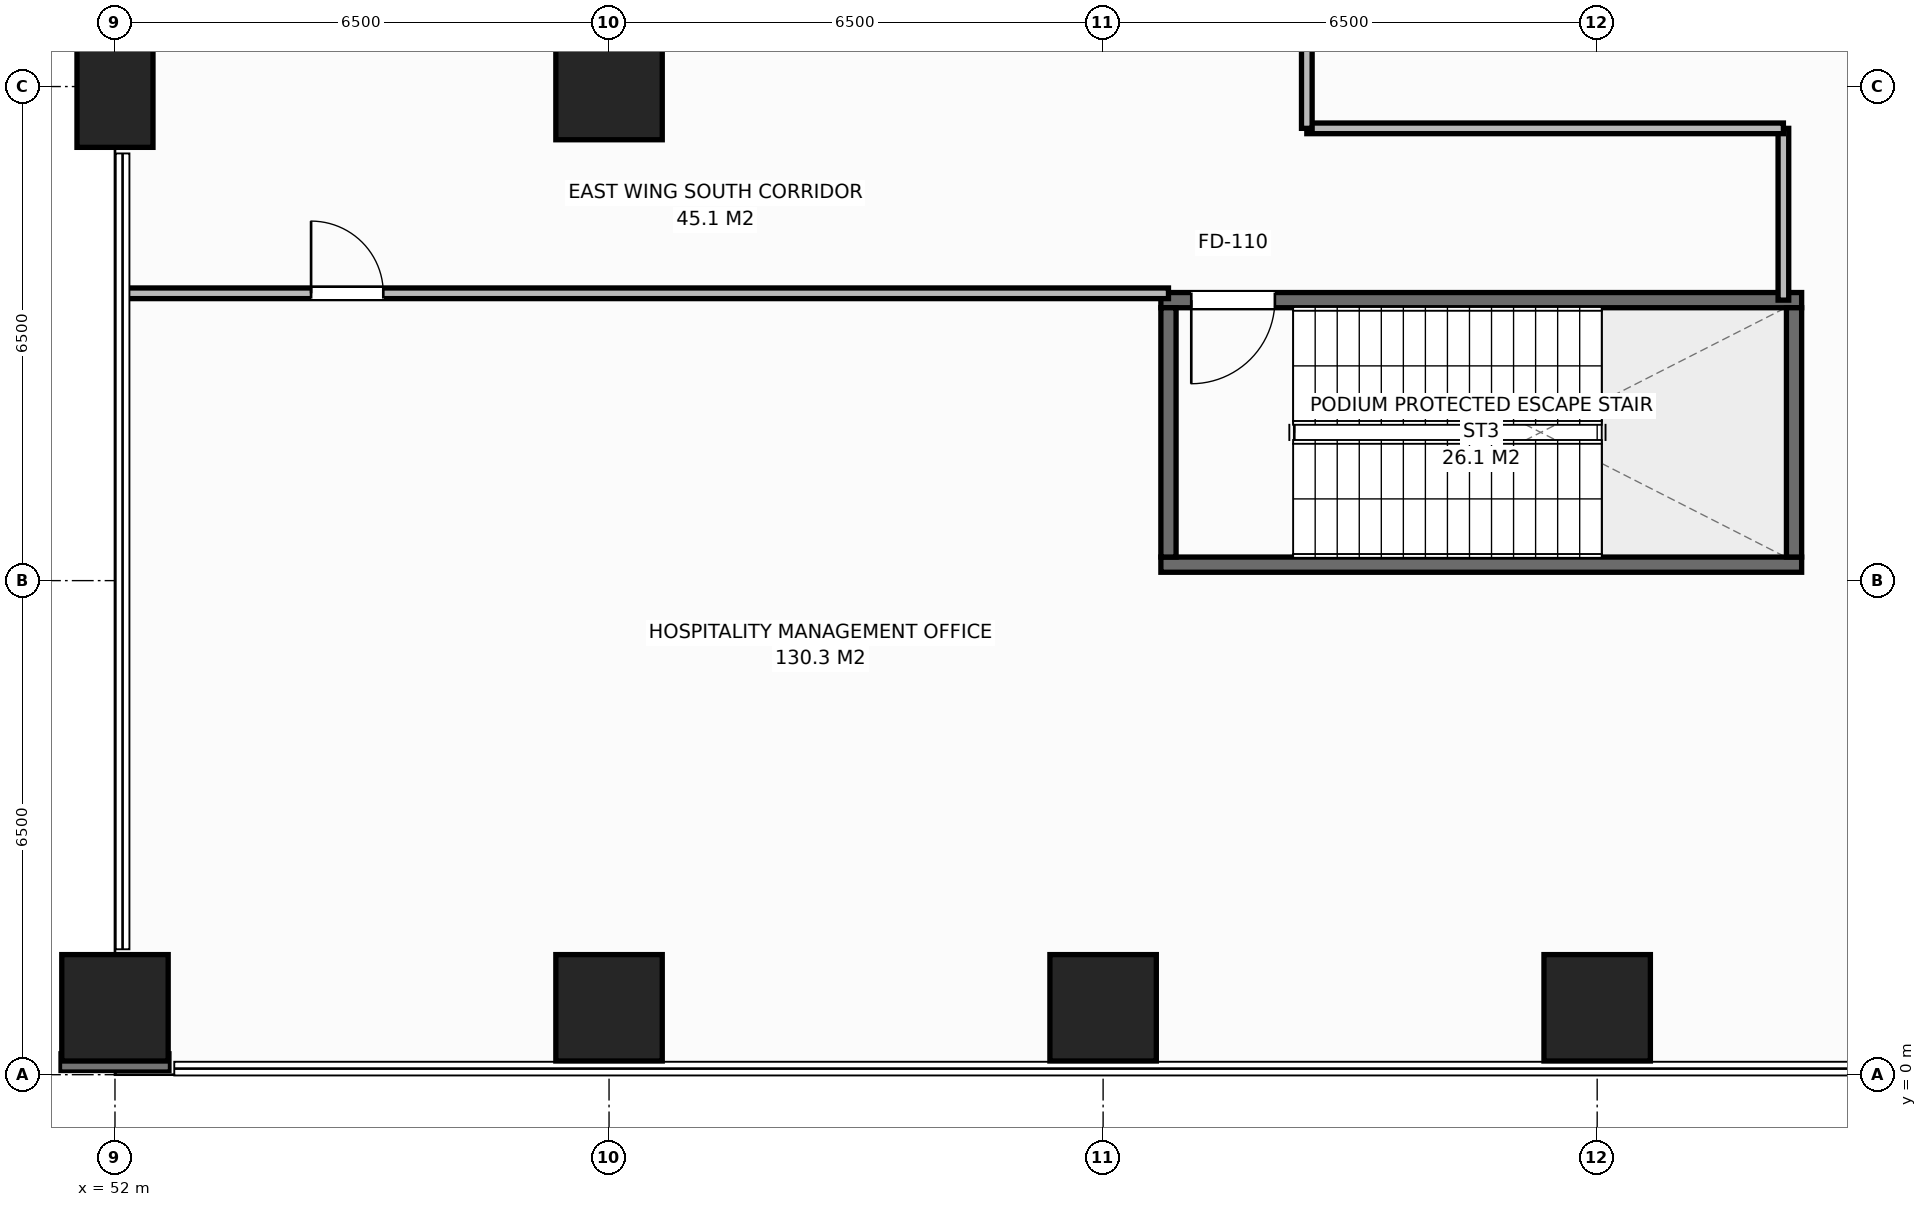
"""IFC4 building model, lengths in metres.
Left out: names, types, materials, properties, quantities, classifications, styles, units other than length and angle.
Written with IfcOpenShell. Run it as: python <this file> out.ifc"""

import sys

from ifc_helpers import new_model, si_unit, direction, frame, frame_2d, origin, origin_2d, place, context, subcontext, project, spatial, rectangle, extrude, element, fill, save


model = new_model("IFC4")
c1 = context("Model", 3, precision=1e-05, world=origin(), true_north=direction((0.0, 1.0)))
c2 = subcontext(c1, "Body", "Model", "MODEL_VIEW")
j1 = project(units=[si_unit("LENGTHUNIT", "METRE"), si_unit("PLANEANGLEUNIT", "RADIAN")], contexts=[c1])
p1 = place(None, origin())
s1 = spatial("IfcSite", under=j1, at=p1, CompositionType="ELEMENT")
p2 = place(p1, origin())
s2 = spatial("IfcBuilding", under=s1, at=p2, CompositionType="ELEMENT")
p3 = place(p2, frame((0.0, 0.0, 17.0)))
s3 = spatial("IfcBuildingStorey", under=s2, at=p3, CompositionType="ELEMENT", Elevation=17.0)
p4 = place(p3, frame((65.76, 6.71, 0.0), z_axis=(0.0, 0.0, 1.0), x_axis=(1.0, 0.0, 0.0)))
e1 = element("IfcWall", 1, at=p4, inside=s3, PredefinedType="SHEAR", context=c2, shape_type="SweptSolid", body=[
    extrude(rectangle(XDim=8.43, YDim=0.2, at=frame_2d((4.215, 0.0))), origin(), (0.0, 0.0, 1.0), 5.0),
])
p5 = place(p3, frame((65.76, 10.19, 0.0), z_axis=(0.0, 0.0, 1.0), x_axis=(1.0, 0.0, 0.0)))
e2 = element("IfcWall", 2, at=p5, inside=s3, PredefinedType="SHEAR", context=c2, shape_type="SweptSolid", body=[
    extrude(rectangle(XDim=8.43, YDim=0.2, at=frame_2d((4.215, 0.0))), origin(), (0.0, 0.0, 1.0), 5.0),
])
p6 = place(p5, frame((0.4, 0.0, 0.0)))
e3 = element("IfcOpeningElement", 3, at=p6, cuts=e2, PredefinedType="OPENING", context=c2, shape_type="SweptSolid", body=[
    extrude(rectangle(XDim=1.1, YDim=2.15, at=frame_2d((0.55, 1.075))), frame((0.0, 0.11, 0.0), z_axis=(0.0, -1.0, 0.0), x_axis=(1.0, 0.0, 0.0)), (0.0, 0.0, 1.0), 0.22),
])
for number, where, z_axis, x_axis in (
    (4, (65.86, 6.81, 0.0), (0.0, 0.0, 1.0), (0.0, 1.0, 0.0)),
    (5, (74.09, 6.81, 0.0), (0.0, 0.0, 1.0), (0.0, 1.0, 0.0)),
):
    element("IfcWall", number, at=place(p3, frame(where, z_axis=z_axis, x_axis=x_axis)), inside=s3, PredefinedType="SHEAR", context=c2, shape_type="SweptSolid", body=[
        extrude(rectangle(XDim=3.28, YDim=0.2, at=frame_2d((1.64, 0.0))), origin(), (0.0, 0.0, 1.0), 5.0),
    ])
p7 = place(p3, frame((58.5, 13.0, 0.0), z_axis=(0.0, 0.0, 1.0), x_axis=(1.0, 0.0, 0.0)))
e6 = element("IfcColumn", 6, at=p7, inside=s3, PredefinedType="COLUMN", context=c2, shape_type="SweptSolid", body=[
    extrude(rectangle(XDim=1.4, YDim=1.4, at=origin_2d()), origin(), (0.0, 0.0, 1.0), 5.0),
])
p8 = place(p3, frame((52.0, 13.0, 0.0), z_axis=(0.0, 0.0, 1.0), x_axis=(1.0, 0.0, 0.0)))
e7 = element("IfcColumn", 7, at=p8, inside=s3, PredefinedType="PILASTER", context=c2, shape_type="SweptSolid", body=[
    extrude(rectangle(XDim=1.0, YDim=1.6, at=origin_2d()), origin(), (0.0, 0.0, 1.0), 5.0),
])
for number, where, z_axis, x_axis in (
    (8, (52.0, 0.88, 0.0), (0.0, 0.0, 1.0), (1.0, 0.0, 0.0)),
    (9, (58.5, 0.88, 0.0), (0.0, 0.0, 1.0), (1.0, 0.0, 0.0)),
    (10, (65.0, 0.88, 0.0), (0.0, 0.0, 1.0), (1.0, 0.0, 0.0)),
    (11, (71.5, 0.88, 0.0), (0.0, 0.0, 1.0), (1.0, 0.0, 0.0)),
):
    element("IfcColumn", number, at=place(p3, frame(where, z_axis=z_axis, x_axis=x_axis)), inside=s3, PredefinedType="COLUMN", context=c2, shape_type="SweptSolid", body=[
        extrude(rectangle(XDim=1.4, YDim=1.4, at=origin_2d()), origin(), (0.0, 0.0, 1.0), 5.0),
    ])
p9 = place(p3, frame((73.95, 10.19, 0.0), z_axis=(0.0, 0.0, 1.0), x_axis=(0.0, 1.0, 0.0)))
e12 = element("IfcWall", 12, at=p9, inside=s3, PredefinedType="PARTITIONING", context=c2, shape_type="SweptSolid", body=[
    extrude(rectangle(XDim=2.26, YDim=0.14, at=frame_2d((1.13, 0.0))), origin(), (0.0, 0.0, 1.0), 4.4),
])
p10 = place(p3, frame((67.68, 12.45, 0.0), z_axis=(0.0, 0.0, 1.0), x_axis=(1.0, 0.0, 0.0)))
e13 = element("IfcWall", 13, at=p10, inside=s3, PredefinedType="PARTITIONING", context=c2, shape_type="SweptSolid", body=[
    extrude(rectangle(XDim=6.27, YDim=0.14, at=frame_2d((3.135, 0.0))), origin(), (0.0, 0.0, 1.0), 4.4),
])
p11 = place(p3, frame((67.68, 12.45, 0.0), z_axis=(0.0, 0.0, 1.0), x_axis=(0.0, 1.0, 0.0)))
e14 = element("IfcWall", 14, at=p11, inside=s3, PredefinedType="PARTITIONING", context=c2, shape_type="SweptSolid", body=[
    extrude(rectangle(XDim=11.65, YDim=0.14, at=frame_2d((5.825, 0.0))), origin(), (0.0, 0.0, 1.0), 4.4),
])
p12 = place(p11, frame((3.0, 0.0, 0.0)))
e15 = element("IfcOpeningElement", 15, at=p12, cuts=e14, PredefinedType="OPENING", context=c2, shape_type="SweptSolid", body=[
    extrude(rectangle(XDim=1.1, YDim=2.15, at=frame_2d((0.55, 1.075))), frame((0.0, 0.08, 0.0), z_axis=(0.0, -1.0, 0.0), x_axis=(1.0, 0.0, 0.0)), (0.0, 0.0, 1.0), 0.16),
])
p13 = place(p3, frame((52.08, 10.28, 0.0), z_axis=(0.0, 0.0, 1.0), x_axis=(1.0, 0.0, 0.0)))
e16 = element("IfcWall", 16, at=p13, inside=s3, PredefinedType="PARTITIONING", context=c2, shape_type="SweptSolid", body=[
    extrude(rectangle(XDim=13.78, YDim=0.14, at=frame_2d((6.89, 0.0))), origin(), (0.0, 0.0, 1.0), 4.4),
])
p14 = place(p13, frame((2.5, 0.0, 0.0)))
e17 = element("IfcOpeningElement", 17, at=p14, cuts=e16, PredefinedType="OPENING", context=c2, shape_type="SweptSolid", body=[
    extrude(rectangle(XDim=0.95, YDim=2.15, at=frame_2d((0.475, 1.075))), frame((0.0, 0.08, 0.0), z_axis=(0.0, -1.0, 0.0), x_axis=(1.0, 0.0, 0.0)), (0.0, 0.0, 1.0), 0.16),
])
p15 = place(p6, origin())
e18 = element("IfcDoor", 18, at=p15, inside=s3, OperationType="SINGLE_SWING_RIGHT", PredefinedType="DOOR", context=c2, shape_type="SweptSolid", body=[
    extrude(rectangle(XDim=1.1, YDim=2.15, at=frame_2d((0.55, 1.075))), frame((0.0, 0.025, 0.0), z_axis=(0.0, -1.0, 0.0), x_axis=(1.0, 0.0, 0.0)), (0.0, 0.0, 1.0), 0.05),
])
fill(e3, e18)
p16 = place(p14, origin())
e19 = element("IfcDoor", 19, at=p16, inside=s3, OperationType="SINGLE_SWING_LEFT", PredefinedType="DOOR", context=c2, shape_type="SweptSolid", body=[
    extrude(rectangle(XDim=0.95, YDim=2.15, at=frame_2d((0.475, 1.075))), frame((0.0, 0.025, 0.0), z_axis=(0.0, -1.0, 0.0), x_axis=(1.0, 0.0, 0.0)), (0.0, 0.0, 1.0), 0.05),
])
fill(e17, e19)
save(model, sys.argv[1])
